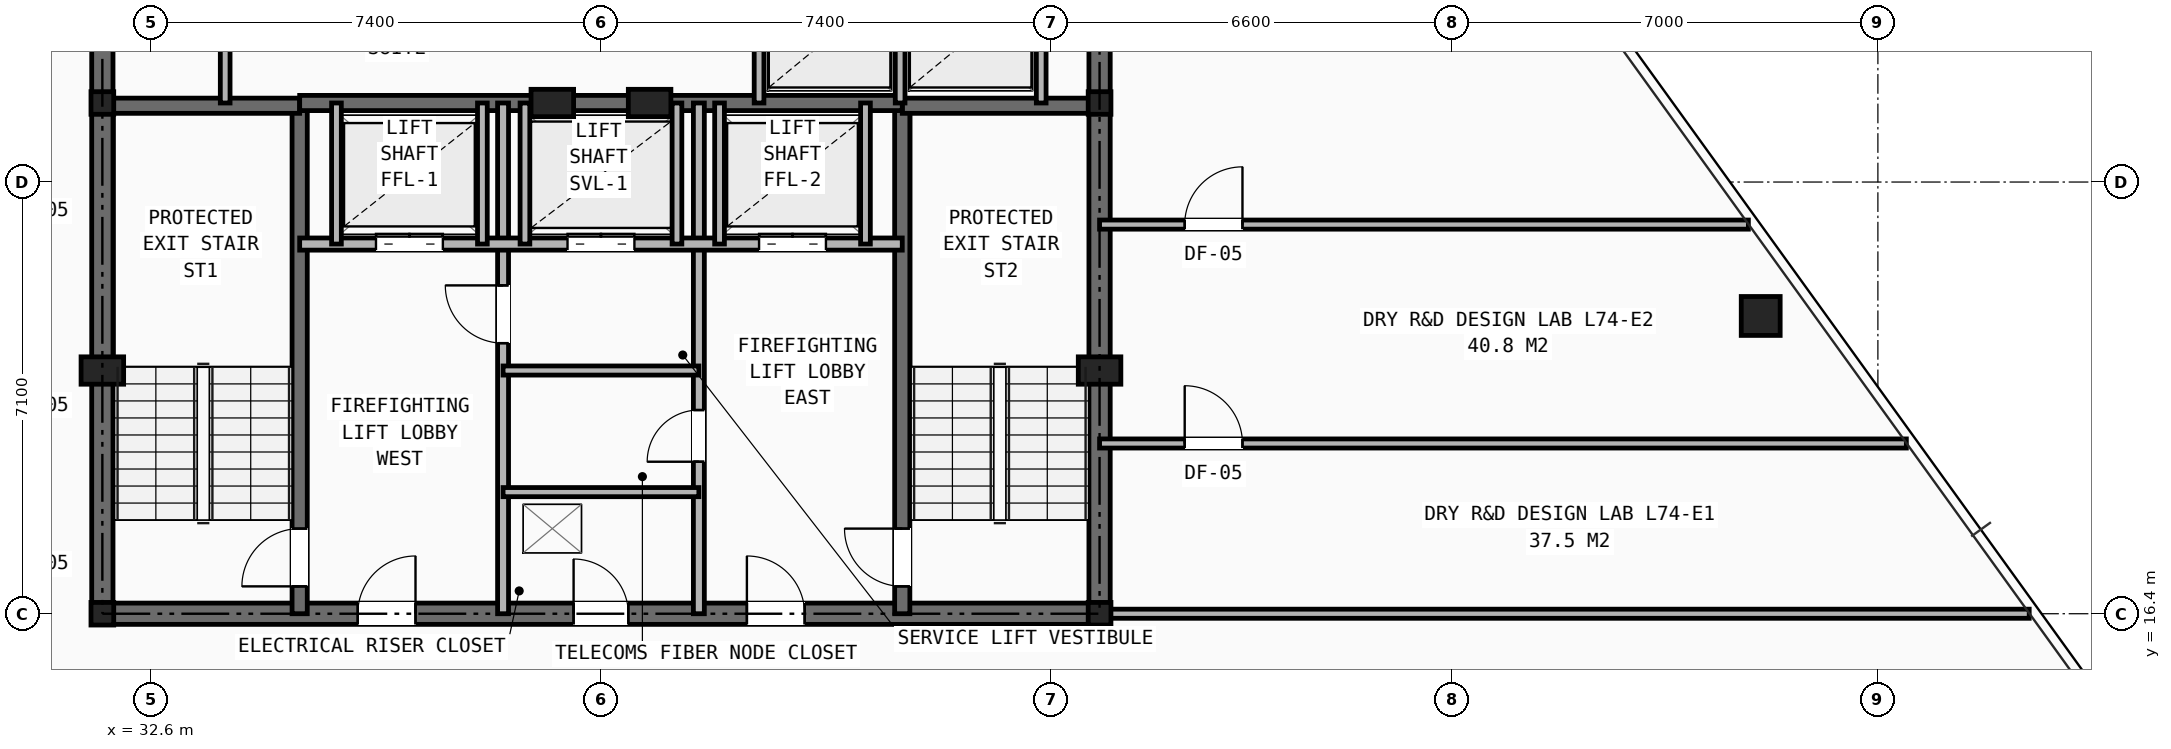
"""IFC4 building model, lengths in metres.
Left out: names, types, materials, properties, quantities, classifications, styles, units other than length and angle.
Written with IfcOpenShell. Run it as: python <this file> out.ifc"""

import sys

from ifc_helpers import new_model, si_unit, direction, frame, frame_2d, origin, origin_2d, place, context, subcontext, project, spatial, rectangle, hollow_rectangle, i_section, extrude, element, fill, save


model = new_model("IFC4")
c1 = context("Model", 3, precision=1e-05, world=origin(), true_north=direction((0.0, 1.0)))
c2 = subcontext(c1, "Body", "Model", "MODEL_VIEW")
j1 = project(units=[si_unit("LENGTHUNIT", "METRE"), si_unit("PLANEANGLEUNIT", "RADIAN")], contexts=[c1])
p1 = place(None, origin())
s1 = spatial("IfcSite", under=j1, at=p1, CompositionType="ELEMENT")
p2 = place(p1, origin())
s2 = spatial("IfcBuilding", under=s1, at=p2, CompositionType="ELEMENT")
p3 = place(p2, frame((0.0, 0.0, 262.0)))
s3 = spatial("IfcBuildingStorey", under=s2, at=p3, CompositionType="ELEMENT", Elevation=262.0)
for number, where, z_axis, x_axis in (
    (1, (31.8, 16.4, 0.0), (0.0, 0.0, 1.0), (1.0, 0.0, 0.0)),
    (2, (48.2, 16.4, 0.0), (0.0, 0.0, 1.0), (1.0, 0.0, 0.0)),
    (3, (31.8, 24.8, 0.0), (0.0, 0.0, 1.0), (1.0, 0.0, 0.0)),
    (4, (48.2, 24.8, 0.0), (0.0, 0.0, 1.0), (1.0, 0.0, 0.0)),
):
    element("IfcColumn", number, at=place(p3, frame(where, z_axis=z_axis, x_axis=x_axis)), inside=s3, PredefinedType="COLUMN", context=c2, shape_type="SweptSolid", body=[
        extrude(i_section(OverallWidth=0.374, OverallDepth=0.372, WebThickness=0.016, FlangeThickness=0.026, at=origin_2d()), origin(), (0.0, 0.0, 1.0), 3.5),
    ])
for number, where, z_axis, x_axis in (
    (5, (31.8, 20.4, 0.0), (0.0, 0.0, 1.0), (1.0, 0.0, 0.0)),
    (6, (48.2, 20.4, 0.0), (0.0, 0.0, 1.0), (1.0, 0.0, 0.0)),
    (7, (39.2, 24.8, 0.0), (0.0, 0.0, 1.0), (1.0, 0.0, 0.0)),
    (8, (40.8, 24.8, 0.0), (0.0, 0.0, 1.0), (1.0, 0.0, 0.0)),
):
    element("IfcColumn", number, at=place(p3, frame(where, z_axis=z_axis, x_axis=x_axis)), inside=s3, PredefinedType="PILASTER", context=c2, shape_type="SweptSolid", body=[
        extrude(rectangle(XDim=0.7, YDim=0.45, at=origin_2d()), origin(), (0.0, 0.0, 1.0), 3.5),
    ])
p4 = place(p3, frame((59.073, 21.297, 0.0), z_axis=(0.0, 0.0, 1.0), x_axis=(1.0, 0.0, 0.0)))
e9 = element("IfcColumn", 9, at=p4, inside=s3, PredefinedType="COLUMN", context=c2, shape_type="SweptSolid", body=[
    extrude(hollow_rectangle(XDim=0.64, YDim=0.64, WallThickness=0.045, at=origin_2d()), origin(), (0.0, 0.0, 1.0), 3.5),
])
p5 = place(p3, frame((31.8, 16.4, 0.0), z_axis=(0.0, 0.0, 1.0), x_axis=(1.0, 0.0, 0.0)))
e10 = element("IfcWall", 10, at=p5, inside=s3, PredefinedType="SHEAR", context=c2, shape_type="SweptSolid", body=[
    extrude(rectangle(XDim=16.4, YDim=0.35, at=frame_2d((8.2, 0.0))), origin(), (0.0, 0.0, 1.0), 3.25),
])
p6 = place(p5, frame((7.75, 0.0, 0.0)))
e11 = element("IfcOpeningElement", 11, at=p6, cuts=e10, PredefinedType="OPENING", context=c2, shape_type="SweptSolid", body=[
    extrude(rectangle(XDim=0.9, YDim=2.1, at=frame_2d((0.45, 1.05))), frame((0.0, 0.185, 0.0), z_axis=(0.0, -1.0, 0.0), x_axis=(1.0, 0.0, 0.0)), (0.0, 0.0, 1.0), 0.37),
])
p7 = place(p5, frame((4.2, 0.0, 0.0)))
e12 = element("IfcOpeningElement", 12, at=p7, cuts=e10, PredefinedType="OPENING", context=c2, shape_type="SweptSolid", body=[
    extrude(rectangle(XDim=0.95, YDim=2.1, at=frame_2d((0.475, 1.05))), frame((0.0, 0.185, 0.0), z_axis=(0.0, -1.0, 0.0), x_axis=(1.0, 0.0, 0.0)), (0.0, 0.0, 1.0), 0.37),
])
p8 = place(p5, frame((10.6, 0.0, 0.0)))
e13 = element("IfcOpeningElement", 13, at=p8, cuts=e10, PredefinedType="OPENING", context=c2, shape_type="SweptSolid", body=[
    extrude(rectangle(XDim=0.95, YDim=2.1, at=frame_2d((0.475, 1.05))), frame((0.0, 0.185, 0.0), z_axis=(0.0, -1.0, 0.0), x_axis=(1.0, 0.0, 0.0)), (0.0, 0.0, 1.0), 0.37),
])
p9 = place(p3, frame((31.8, 16.4, 0.0), z_axis=(0.0, 0.0, 1.0), x_axis=(0.0, 1.0, 0.0)))
e14 = element("IfcWall", 14, at=p9, inside=s3, PredefinedType="SHEAR", context=c2, shape_type="SweptSolid", body=[
    extrude(rectangle(XDim=14.8, YDim=0.35, at=frame_2d((7.4, 0.0))), origin(), (0.0, 0.0, 1.0), 3.25),
])
p10 = place(p9, frame((11.0, 0.0, 0.0)))
e15 = element("IfcOpeningElement", 15, at=p10, cuts=e14, PredefinedType="OPENING", context=c2, shape_type="SweptSolid", body=[
    extrude(rectangle(XDim=1.1, YDim=2.15, at=frame_2d((0.55, 1.075))), frame((0.0, 0.185, 0.0), z_axis=(0.0, -1.0, 0.0), x_axis=(1.0, 0.0, 0.0)), (0.0, 0.0, 1.0), 0.37),
])
p11 = place(p3, frame((48.2, 16.4, 0.0), z_axis=(0.0, 0.0, 1.0), x_axis=(0.0, 1.0, 0.0)))
e16 = element("IfcWall", 16, at=p11, inside=s3, PredefinedType="SHEAR", context=c2, shape_type="SweptSolid", body=[
    extrude(rectangle(XDim=14.8, YDim=0.35, at=frame_2d((7.4, 0.0))), origin(), (0.0, 0.0, 1.0), 3.25),
])
p12 = place(p11, frame((11.0, 0.0, 0.0)))
e17 = element("IfcOpeningElement", 17, at=p12, cuts=e16, PredefinedType="OPENING", context=c2, shape_type="SweptSolid", body=[
    extrude(rectangle(XDim=1.1, YDim=2.15, at=frame_2d((0.55, 1.075))), frame((0.0, 0.185, 0.0), z_axis=(0.0, -1.0, 0.0), x_axis=(1.0, 0.0, 0.0)), (0.0, 0.0, 1.0), 0.37),
])
p13 = place(p3, frame((35.045, 16.4, 0.0), z_axis=(0.0, 0.0, 1.0), x_axis=(0.0, 1.0, 0.0)))
e18 = element("IfcWall", 18, at=p13, inside=s3, PredefinedType="SHEAR", context=c2, shape_type="SweptSolid", body=[
    extrude(rectangle(XDim=8.4, YDim=0.25, at=frame_2d((4.2, 0.0))), origin(), (0.0, 0.0, 1.0), 3.25),
])
p14 = place(p13, frame((0.45, 0.0, 0.0)))
e19 = element("IfcOpeningElement", 19, at=p14, cuts=e18, PredefinedType="OPENING", context=c2, shape_type="SweptSolid", body=[
    extrude(rectangle(XDim=0.95, YDim=2.1, at=frame_2d((0.475, 1.05))), frame((0.0, 0.135, 0.0), z_axis=(0.0, -1.0, 0.0), x_axis=(1.0, 0.0, 0.0)), (0.0, 0.0, 1.0), 0.27),
])
p15 = place(p3, frame((31.8, 24.755, 0.0), z_axis=(0.0, 0.0, 1.0), x_axis=(1.0, 0.0, 0.0)))
e20 = element("IfcWall", 20, at=p15, inside=s3, PredefinedType="SHEAR", context=c2, shape_type="SweptSolid", body=[
    extrude(rectangle(XDim=3.245, YDim=0.25, at=frame_2d((1.623, 0.0))), origin(), (0.0, 0.0, 1.0), 3.25),
])
p16 = place(p3, frame((44.955, 16.4, 0.0), z_axis=(0.0, 0.0, 1.0), x_axis=(0.0, 1.0, 0.0)))
e21 = element("IfcWall", 21, at=p16, inside=s3, PredefinedType="SHEAR", context=c2, shape_type="SweptSolid", body=[
    extrude(rectangle(XDim=8.4, YDim=0.25, at=frame_2d((4.2, 0.0))), origin(), (0.0, 0.0, 1.0), 3.25),
])
p17 = place(p16, frame((0.45, 0.0, 0.0)))
e22 = element("IfcOpeningElement", 22, at=p17, cuts=e21, PredefinedType="OPENING", context=c2, shape_type="SweptSolid", body=[
    extrude(rectangle(XDim=0.95, YDim=2.1, at=frame_2d((0.475, 1.05))), frame((0.0, 0.135, 0.0), z_axis=(0.0, -1.0, 0.0), x_axis=(1.0, 0.0, 0.0)), (0.0, 0.0, 1.0), 0.27),
])
p18 = place(p3, frame((44.955, 24.755, 0.0), z_axis=(0.0, 0.0, 1.0), x_axis=(1.0, 0.0, 0.0)))
e23 = element("IfcWall", 23, at=p18, inside=s3, PredefinedType="SHEAR", context=c2, shape_type="SweptSolid", body=[
    extrude(rectangle(XDim=3.245, YDim=0.25, at=frame_2d((1.623, 0.0))), origin(), (0.0, 0.0, 1.0), 3.25),
])
p19 = place(p3, frame((35.045, 24.8, 0.0), z_axis=(0.0, 0.0, 1.0), x_axis=(1.0, 0.0, 0.0)))
e24 = element("IfcWall", 24, at=p19, inside=s3, PredefinedType="SHEAR", context=c2, shape_type="SweptSolid", body=[
    extrude(rectangle(XDim=9.91, YDim=0.25, at=frame_2d((4.955, 0.0))), origin(), (0.0, 0.0, 1.0), 3.25),
])
p20 = place(p3, frame((38.39, 16.4, 0.0), z_axis=(0.0, 0.0, 1.0), x_axis=(0.0, 1.0, 0.0)))
e25 = element("IfcWall", 25, at=p20, inside=s3, PredefinedType="PARTITIONING", context=c2, shape_type="SweptSolid", body=[
    extrude(rectangle(XDim=8.4, YDim=0.18, at=frame_2d((4.2, 0.0))), origin(), (0.0, 0.0, 1.0), 2.705),
])
p21 = place(p20, frame((4.45, 0.0, 0.0)))
e26 = element("IfcOpeningElement", 26, at=p21, cuts=e25, PredefinedType="OPENING", context=c2, shape_type="SweptSolid", body=[
    extrude(rectangle(XDim=0.95, YDim=2.1, at=frame_2d((0.475, 1.05))), frame((0.0, 0.1, 0.0), z_axis=(0.0, -1.0, 0.0), x_axis=(1.0, 0.0, 0.0)), (0.0, 0.0, 1.0), 0.2),
])
p22 = place(p3, frame((41.61, 16.4, 0.0), z_axis=(0.0, 0.0, 1.0), x_axis=(0.0, 1.0, 0.0)))
e27 = element("IfcWall", 27, at=p22, inside=s3, PredefinedType="PARTITIONING", context=c2, shape_type="SweptSolid", body=[
    extrude(rectangle(XDim=8.4, YDim=0.18, at=frame_2d((4.2, 0.0))), origin(), (0.0, 0.0, 1.0), 2.705),
])
p23 = place(p22, frame((2.5, 0.0, 0.0)))
e28 = element("IfcOpeningElement", 28, at=p23, cuts=e27, PredefinedType="OPENING", context=c2, shape_type="SweptSolid", body=[
    extrude(rectangle(XDim=0.85, YDim=2.05, at=frame_2d((0.425, 1.025))), frame((0.0, 0.1, 0.0), z_axis=(0.0, -1.0, 0.0), x_axis=(1.0, 0.0, 0.0)), (0.0, 0.0, 1.0), 0.2),
])
p24 = place(p3, frame((35.045, 22.48, 0.0), z_axis=(0.0, 0.0, 1.0), x_axis=(1.0, 0.0, 0.0)))
e29 = element("IfcWall", 29, at=p24, inside=s3, PredefinedType="SOLIDWALL", context=c2, shape_type="SweptSolid", body=[
    extrude(rectangle(XDim=9.91, YDim=0.2, at=frame_2d((4.955, 0.0))), origin(), (0.0, 0.0, 1.0), 3.25),
])
p25 = place(p24, frame((1.255, 0.0, 0.0)))
e30 = element("IfcOpeningElement", 30, at=p25, cuts=e29, PredefinedType="OPENING", context=c2, shape_type="SweptSolid", body=[
    extrude(rectangle(XDim=1.1, YDim=2.15, at=frame_2d((0.55, 1.075))), frame((0.0, 0.11, 0.0), z_axis=(0.0, -1.0, 0.0), x_axis=(1.0, 0.0, 0.0)), (0.0, 0.0, 1.0), 0.22),
])
p26 = place(p24, frame((7.555, 0.0, 0.0)))
e31 = element("IfcOpeningElement", 31, at=p26, cuts=e29, PredefinedType="OPENING", context=c2, shape_type="SweptSolid", body=[
    extrude(rectangle(XDim=1.1, YDim=2.15, at=frame_2d((0.55, 1.075))), frame((0.0, 0.11, 0.0), z_axis=(0.0, -1.0, 0.0), x_axis=(1.0, 0.0, 0.0)), (0.0, 0.0, 1.0), 0.22),
])
p27 = place(p24, frame((4.405, 0.0, 0.0)))
e32 = element("IfcOpeningElement", 32, at=p27, cuts=e29, PredefinedType="OPENING", context=c2, shape_type="SweptSolid", body=[
    extrude(rectangle(XDim=1.1, YDim=2.15, at=frame_2d((0.55, 1.075))), frame((0.0, 0.11, 0.0), z_axis=(0.0, -1.0, 0.0), x_axis=(1.0, 0.0, 0.0)), (0.0, 0.0, 1.0), 0.22),
])
for number, where, z_axis, x_axis in (
    (33, (38.39, 18.4, 0.0), (0.0, 0.0, 1.0), (1.0, 0.0, 0.0)),
    (34, (38.39, 20.4, 0.0), (0.0, 0.0, 1.0), (1.0, 0.0, 0.0)),
):
    element("IfcWall", number, at=place(p3, frame(where, z_axis=z_axis, x_axis=x_axis)), inside=s3, PredefinedType="PARTITIONING", context=c2, shape_type="SweptSolid", body=[
        extrude(rectangle(XDim=3.22, YDim=0.15, at=frame_2d((1.61, 0.0))), origin(), (0.0, 0.0, 1.0), 3.25),
    ])
for number, where, z_axis, x_axis in (
    (35, (35.65, 22.48, 0.0), (0.0, 0.0, 1.0), (0.0, 1.0, 0.0)),
    (36, (38.05, 22.48, 0.0), (0.0, 0.0, 1.0), (0.0, 1.0, 0.0)),
    (37, (41.95, 22.48, 0.0), (0.0, 0.0, 1.0), (0.0, 1.0, 0.0)),
    (38, (44.35, 22.48, 0.0), (0.0, 0.0, 1.0), (0.0, 1.0, 0.0)),
    (39, (38.75, 22.48, 0.0), (0.0, 0.0, 1.0), (0.0, 1.0, 0.0)),
    (40, (41.25, 22.48, 0.0), (0.0, 0.0, 1.0), (0.0, 1.0, 0.0)),
):
    element("IfcWall", number, at=place(p3, frame(where, z_axis=z_axis, x_axis=x_axis)), inside=s3, PredefinedType="SOLIDWALL", context=c2, shape_type="SweptSolid", body=[
        extrude(rectangle(XDim=2.32, YDim=0.16, at=frame_2d((1.16, 0.0))), origin(), (0.0, 0.0, 1.0), 3.25),
    ])
for number, where, z_axis, x_axis in (
    (41, (33.82, 24.8, 0.0), (0.0, 0.0, 1.0), (0.0, 1.0, 0.0)),
    (42, (42.6, 24.8, 0.0), (0.0, 0.0, 1.0), (0.0, 1.0, 0.0)),
    (43, (44.92, 24.8, 0.0), (0.0, 0.0, 1.0), (0.0, 1.0, 0.0)),
    (44, (47.24, 24.8, 0.0), (0.0, 0.0, 1.0), (0.0, 1.0, 0.0)),
):
    element("IfcWall", number, at=place(p3, frame(where, z_axis=z_axis, x_axis=x_axis)), inside=s3, PredefinedType="SOLIDWALL", context=c2, shape_type="SweptSolid", body=[
        extrude(rectangle(XDim=2.08, YDim=0.16, at=frame_2d((1.04, 0.0))), origin(), (0.0, 0.0, 1.0), 3.25),
    ])
p28 = place(p3, frame((48.2, 16.4, 0.0), z_axis=(0.0, 0.0, 1.0), x_axis=(1.0, 0.0, 0.0)))
e45 = element("IfcWall", 45, at=p28, inside=s3, PredefinedType="PARTITIONING", context=c2, shape_type="SweptSolid", body=[
    extrude(rectangle(XDim=15.289, YDim=0.15, at=frame_2d((7.644, 0.0))), origin(), (0.0, 0.0, 1.0), 2.265),
])
p29 = place(p3, frame((48.2, 19.2, 0.0), z_axis=(0.0, 0.0, 1.0), x_axis=(1.0, 0.0, 0.0)))
e46 = element("IfcWall", 46, at=p29, inside=s3, PredefinedType="PARTITIONING", context=c2, shape_type="SweptSolid", body=[
    extrude(rectangle(XDim=13.268, YDim=0.15, at=frame_2d((6.634, 0.0))), origin(), (0.0, 0.0, 1.0), 2.265),
])
p30 = place(p29, frame((1.4, 0.0, 0.0)))
e47 = element("IfcOpeningElement", 47, at=p30, cuts=e46, PredefinedType="OPENING", context=c2, shape_type="SweptSolid", body=[
    extrude(rectangle(XDim=0.95, YDim=2.1, at=frame_2d((0.475, 1.05))), frame((0.0, 0.085, 0.0), z_axis=(0.0, -1.0, 0.0), x_axis=(1.0, 0.0, 0.0)), (0.0, 0.0, 1.0), 0.17),
])
p31 = place(p3, frame((48.2, 22.8, 0.0), z_axis=(0.0, 0.0, 1.0), x_axis=(1.0, 0.0, 0.0)))
e48 = element("IfcWall", 48, at=p31, inside=s3, PredefinedType="PARTITIONING", context=c2, shape_type="SweptSolid", body=[
    extrude(rectangle(XDim=10.67, YDim=0.15, at=frame_2d((5.335, 0.0))), origin(), (0.0, 0.0, 1.0), 2.628),
])
p32 = place(p31, frame((1.4, 0.0, 0.0)))
e49 = element("IfcOpeningElement", 49, at=p32, cuts=e48, PredefinedType="OPENING", context=c2, shape_type="SweptSolid", body=[
    extrude(rectangle(XDim=0.95, YDim=2.1, at=frame_2d((0.475, 1.05))), frame((0.0, 0.085, 0.0), z_axis=(0.0, -1.0, 0.0), x_axis=(1.0, 0.0, 0.0)), (0.0, 0.0, 1.0), 0.17),
])
p33 = place(p6, origin())
e50 = element("IfcDoor", 50, at=p33, inside=s3, OperationType="SINGLE_SWING_LEFT", PredefinedType="DOOR", context=c2, shape_type="SweptSolid", body=[
    extrude(rectangle(XDim=0.9, YDim=2.1, at=frame_2d((0.45, 1.05))), frame((0.0, 0.025, 0.0), z_axis=(0.0, -1.0, 0.0), x_axis=(1.0, 0.0, 0.0)), (0.0, 0.0, 1.0), 0.05),
])
fill(e11, e50)
p34 = place(p23, origin())
e51 = element("IfcDoor", 51, at=p34, inside=s3, OperationType="SINGLE_SWING_LEFT", PredefinedType="DOOR", context=c2, shape_type="SweptSolid", body=[
    extrude(rectangle(XDim=0.85, YDim=2.05, at=frame_2d((0.425, 1.025))), frame((0.0, 0.025, 0.0), z_axis=(0.0, -1.0, 0.0), x_axis=(1.0, 0.0, 0.0)), (0.0, 0.0, 1.0), 0.05),
])
fill(e28, e51)
p35 = place(p21, origin())
e52 = element("IfcDoor", 52, at=p35, inside=s3, OperationType="SINGLE_SWING_RIGHT", PredefinedType="DOOR", context=c2, shape_type="SweptSolid", body=[
    extrude(rectangle(XDim=0.95, YDim=2.1, at=frame_2d((0.475, 1.05))), frame((0.0, 0.025, 0.0), z_axis=(0.0, -1.0, 0.0), x_axis=(1.0, 0.0, 0.0)), (0.0, 0.0, 1.0), 0.05),
])
fill(e26, e52)
p36 = place(p14, origin())
e53 = element("IfcDoor", 53, at=p36, inside=s3, OperationType="SINGLE_SWING_LEFT", PredefinedType="DOOR", context=c2, shape_type="SweptSolid", body=[
    extrude(rectangle(XDim=0.95, YDim=2.1, at=frame_2d((0.475, 1.05))), frame((0.0, 0.025, 0.0), z_axis=(0.0, -1.0, 0.0), x_axis=(1.0, 0.0, 0.0)), (0.0, 0.0, 1.0), 0.05),
])
fill(e19, e53)
p37 = place(p17, origin())
e54 = element("IfcDoor", 54, at=p37, inside=s3, OperationType="SINGLE_SWING_RIGHT", PredefinedType="DOOR", context=c2, shape_type="SweptSolid", body=[
    extrude(rectangle(XDim=0.95, YDim=2.1, at=frame_2d((0.475, 1.05))), frame((0.0, 0.025, 0.0), z_axis=(0.0, -1.0, 0.0), x_axis=(1.0, 0.0, 0.0)), (0.0, 0.0, 1.0), 0.05),
])
fill(e22, e54)
p38 = place(p7, origin())
e55 = element("IfcDoor", 55, at=p38, inside=s3, OperationType="SINGLE_SWING_RIGHT", PredefinedType="DOOR", context=c2, shape_type="SweptSolid", body=[
    extrude(rectangle(XDim=0.95, YDim=2.1, at=frame_2d((0.475, 1.05))), frame((0.0, 0.025, 0.0), z_axis=(0.0, -1.0, 0.0), x_axis=(1.0, 0.0, 0.0)), (0.0, 0.0, 1.0), 0.05),
])
fill(e12, e55)
p39 = place(p8, origin())
e56 = element("IfcDoor", 56, at=p39, inside=s3, OperationType="SINGLE_SWING_LEFT", PredefinedType="DOOR", context=c2, shape_type="SweptSolid", body=[
    extrude(rectangle(XDim=0.95, YDim=2.1, at=frame_2d((0.475, 1.05))), frame((0.0, 0.025, 0.0), z_axis=(0.0, -1.0, 0.0), x_axis=(1.0, 0.0, 0.0)), (0.0, 0.0, 1.0), 0.05),
])
fill(e13, e56)
p40 = place(p25, origin())
e57 = element("IfcDoor", 57, at=p40, inside=s3, OperationType="DOUBLE_DOOR_SLIDING", PredefinedType="DOOR", context=c2, shape_type="SweptSolid", body=[
    extrude(rectangle(XDim=1.1, YDim=2.15, at=frame_2d((0.55, 1.075))), frame((0.0, 0.025, 0.0), z_axis=(0.0, -1.0, 0.0), x_axis=(1.0, 0.0, 0.0)), (0.0, 0.0, 1.0), 0.05),
])
fill(e30, e57)
p41 = place(p26, origin())
e58 = element("IfcDoor", 58, at=p41, inside=s3, OperationType="DOUBLE_DOOR_SLIDING", PredefinedType="DOOR", context=c2, shape_type="SweptSolid", body=[
    extrude(rectangle(XDim=1.1, YDim=2.15, at=frame_2d((0.55, 1.075))), frame((0.0, 0.025, 0.0), z_axis=(0.0, -1.0, 0.0), x_axis=(1.0, 0.0, 0.0)), (0.0, 0.0, 1.0), 0.05),
])
fill(e31, e58)
p42 = place(p27, origin())
e59 = element("IfcDoor", 59, at=p42, inside=s3, OperationType="DOUBLE_DOOR_SLIDING", PredefinedType="DOOR", context=c2, shape_type="SweptSolid", body=[
    extrude(rectangle(XDim=1.1, YDim=2.15, at=frame_2d((0.55, 1.075))), frame((0.0, 0.025, 0.0), z_axis=(0.0, -1.0, 0.0), x_axis=(1.0, 0.0, 0.0)), (0.0, 0.0, 1.0), 0.05),
])
fill(e32, e59)
p43 = place(p30, origin())
e60 = element("IfcDoor", 60, at=p43, inside=s3, OperationType="SINGLE_SWING_LEFT", PredefinedType="DOOR", context=c2, shape_type="SweptSolid", body=[
    extrude(rectangle(XDim=0.95, YDim=2.1, at=frame_2d((0.475, 1.05))), frame((0.0, 0.025, 0.0), z_axis=(0.0, -1.0, 0.0), x_axis=(1.0, 0.0, 0.0)), (0.0, 0.0, 1.0), 0.05),
])
fill(e47, e60)
p44 = place(p32, origin())
e61 = element("IfcDoor", 61, at=p44, inside=s3, OperationType="SINGLE_SWING_RIGHT", PredefinedType="DOOR", context=c2, shape_type="SweptSolid", body=[
    extrude(rectangle(XDim=0.95, YDim=2.1, at=frame_2d((0.475, 1.05))), frame((0.0, 0.025, 0.0), z_axis=(0.0, -1.0, 0.0), x_axis=(1.0, 0.0, 0.0)), (0.0, 0.0, 1.0), 0.05),
])
fill(e49, e61)
save(model, sys.argv[1])
